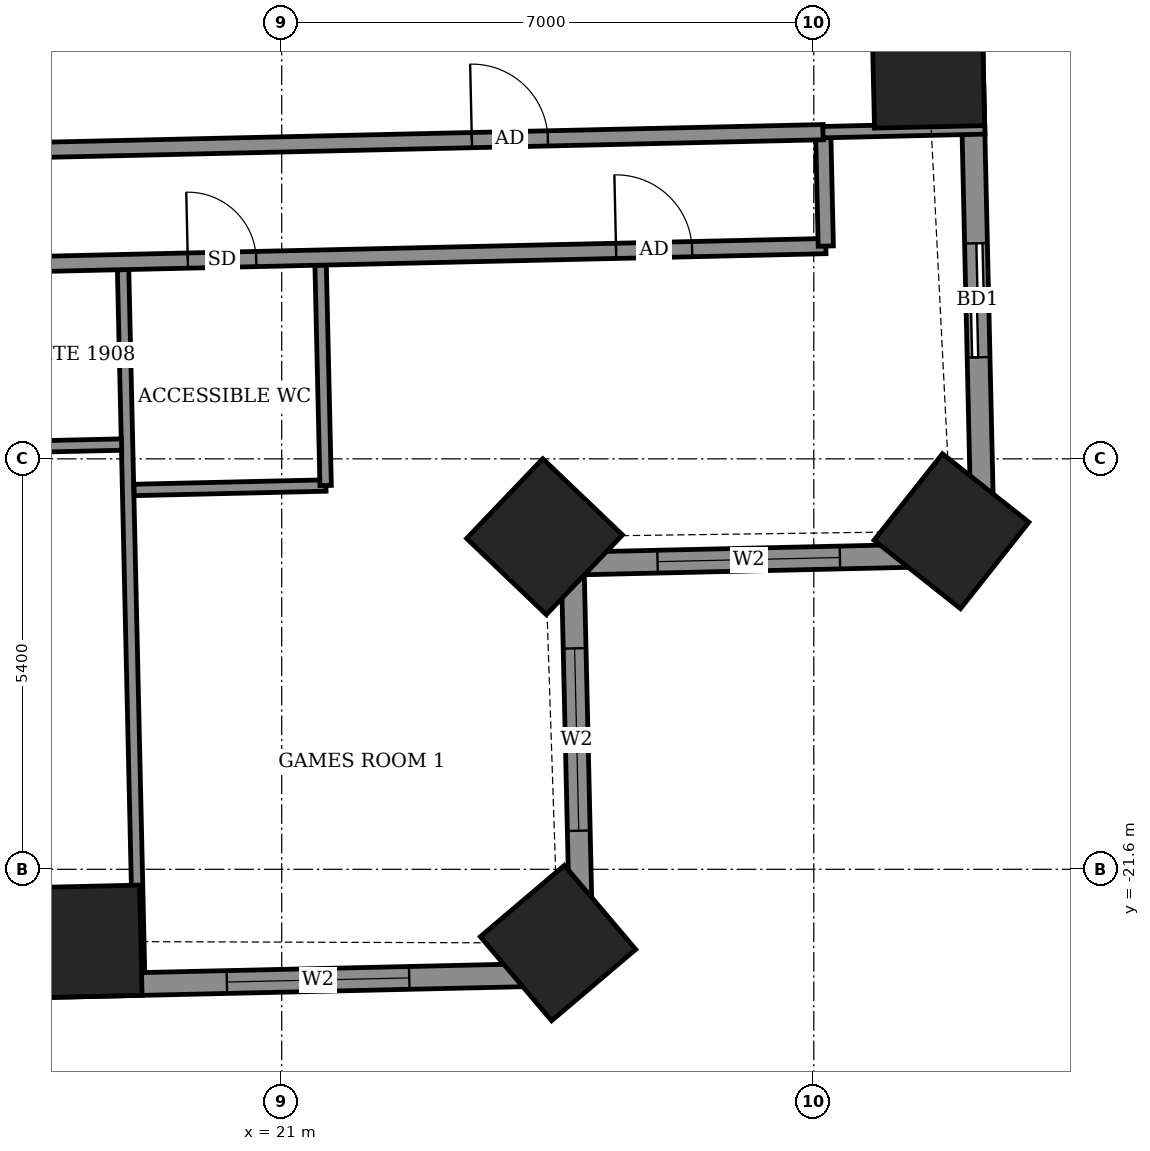
"""IFC4 building model, lengths in metres.
Left out: names, types, materials, properties, quantities, classifications, styles, units other than length and angle.
Written with IfcOpenShell. Run it as: python <this file> out.ifc"""

import sys

from ifc_helpers import new_model, si_unit, direction, frame, frame_2d, origin, origin_2d, place, context, subcontext, project, spatial, rectangle, extrude, element, fill, save


model = new_model("IFC4")
c1 = context("Model", 3, precision=1e-05, world=origin(), true_north=direction((0.0, 1.0)))
c2 = subcontext(c1, "Body", "Model", "MODEL_VIEW")
j1 = project(units=[si_unit("LENGTHUNIT", "METRE"), si_unit("PLANEANGLEUNIT", "RADIAN")], contexts=[c1])
p1 = place(None, origin())
s1 = spatial("IfcSite", under=j1, at=p1, CompositionType="ELEMENT")
p2 = place(p1, origin())
s2 = spatial("IfcBuilding", under=s1, at=p2, CompositionType="ELEMENT")
p3 = place(p2, frame((0.0, 0.0, 79.3)))
s3 = spatial("IfcBuildingStorey", under=s2, at=p3, CompositionType="ELEMENT", Elevation=79.3)
for number, where, z_axis, x_axis in (
    (1, (18.422, -22.549, -0.55), (0.0, 0.0, 1.0), (1.0, 0.023, 0.0)),
    (2, (24.635, -22.57, -0.55), (0.0, 0.0, 1.0), (0.763, 0.647, 0.0)),
    (3, (24.458, -17.224, -0.55), (0.0, 0.0, 1.0), (0.691, 0.723, 0.0)),
    (4, (29.812, -17.152, -0.55), (0.0, 0.0, 1.0), (0.621, 0.784, 0.0)),
    (5, (29.507, -11.107, -0.55), (0.0, 0.0, 1.0), (-0.023, 1.0, 0.0)),
):
    element("IfcColumn", number, at=place(p3, frame(where, z_axis=z_axis, x_axis=x_axis)), inside=s3, PredefinedType="COLUMN", context=c2, shape_type="SweptSolid", body=[
        extrude(rectangle(XDim=1.45, YDim=1.45, at=origin_2d()), origin(), (0.0, 0.0, 1.0), 3.6),
    ])
p4 = place(p3, frame((30.227, -17.455, 0.0), z_axis=(0.0, 0.0, 1.0), x_axis=(-0.022734702163, 0.999741533256, 0.0)))
e6 = element("IfcWall", 6, at=p4, inside=s3, PredefinedType="SOLIDWALL", context=c2, shape_type="SweptSolid", body=[
    extrude(rectangle(XDim=12.929, YDim=0.3, at=frame_2d((6.465, 0.0))), origin(), (0.0, 0.0, 1.0), 3.05),
])
p5 = place(p4, frame((2.592, 0.0, 0.0)))
e7 = element("IfcOpeningElement", 7, at=p5, cuts=e6, PredefinedType="OPENING", context=c2, shape_type="SweptSolid", body=[
    extrude(rectangle(XDim=1.5, YDim=2.4, at=frame_2d((0.75, 1.2))), frame((0.0, 0.16, 0.0), z_axis=(0.0, -1.0, 0.0), x_axis=(1.0, 0.0, 0.0)), (0.0, 0.0, 1.0), 0.32),
])
p6 = place(p4, frame((7.659, 0.0, 0.9)))
e8 = element("IfcOpeningElement", 8, at=p6, cuts=e6, PredefinedType="OPENING", context=c2, shape_type="SweptSolid", body=[
    extrude(rectangle(XDim=1.2, YDim=1.5, at=frame_2d((0.6, 0.75))), frame((0.0, 0.16, 0.0), z_axis=(0.0, -1.0, 0.0), x_axis=(1.0, 0.0, 0.0)), (0.0, 0.0, 1.0), 0.32),
])
p7 = place(p3, frame((-21.409, -24.029, 0.0), z_axis=(0.0, 0.0, 1.0), x_axis=(0.999742634032, 0.022686244721, 0.0)))
e9 = element("IfcWall", 9, at=p7, inside=s3, PredefinedType="SOLIDWALL", context=c2, shape_type="SweptSolid", body=[
    extrude(rectangle(XDim=46.372, YDim=0.3, at=frame_2d((23.186, 0.0))), origin(), (0.0, 0.0, 1.0), 3.05),
])
p8 = place(p7, frame((1.985, 0.0, 0.0)))
e10 = element("IfcOpeningElement", 10, at=p8, cuts=e9, PredefinedType="OPENING", context=c2, shape_type="SweptSolid", body=[
    extrude(rectangle(XDim=1.5, YDim=2.4, at=frame_2d((0.75, 1.2))), frame((0.0, 0.16, 0.0), z_axis=(0.0, -1.0, 0.0), x_axis=(1.0, 0.0, 0.0)), (0.0, 0.0, 1.0), 0.32),
])
p9 = place(p7, frame((7.371, 0.0, 0.0)))
e11 = element("IfcOpeningElement", 11, at=p9, cuts=e9, PredefinedType="OPENING", context=c2, shape_type="SweptSolid", body=[
    extrude(rectangle(XDim=1.2, YDim=2.4, at=frame_2d((0.6, 1.2))), frame((0.0, 0.16, 0.0), z_axis=(0.0, -1.0, 0.0), x_axis=(1.0, 0.0, 0.0)), (0.0, 0.0, 1.0), 0.32),
])
p10 = place(p7, frame((10.08, 0.0, 0.0)))
e12 = element("IfcOpeningElement", 12, at=p10, cuts=e9, PredefinedType="OPENING", context=c2, shape_type="SweptSolid", body=[
    extrude(rectangle(XDim=1.5, YDim=2.4, at=frame_2d((0.75, 1.2))), frame((0.0, 0.16, 0.0), z_axis=(0.0, -1.0, 0.0), x_axis=(1.0, 0.0, 0.0)), (0.0, 0.0, 1.0), 0.32),
])
p11 = place(p7, frame((15.08, 0.0, 0.0)))
e13 = element("IfcOpeningElement", 13, at=p11, cuts=e9, PredefinedType="OPENING", context=c2, shape_type="SweptSolid", body=[
    extrude(rectangle(XDim=1.5, YDim=2.4, at=frame_2d((0.75, 1.2))), frame((0.0, 0.16, 0.0), z_axis=(0.0, -1.0, 0.0), x_axis=(1.0, 0.0, 0.0)), (0.0, 0.0, 1.0), 0.32),
])
p12 = place(p7, frame((20.813, 0.0, 0.0)))
e14 = element("IfcOpeningElement", 14, at=p12, cuts=e9, PredefinedType="OPENING", context=c2, shape_type="SweptSolid", body=[
    extrude(rectangle(XDim=1.2, YDim=2.4, at=frame_2d((0.6, 1.2))), frame((0.0, 0.16, 0.0), z_axis=(0.0, -1.0, 0.0), x_axis=(1.0, 0.0, 0.0)), (0.0, 0.0, 1.0), 0.32),
])
p13 = place(p7, frame((23.522, 0.0, 0.0)))
e15 = element("IfcOpeningElement", 15, at=p13, cuts=e9, PredefinedType="OPENING", context=c2, shape_type="SweptSolid", body=[
    extrude(rectangle(XDim=1.5, YDim=2.4, at=frame_2d((0.75, 1.2))), frame((0.0, 0.16, 0.0), z_axis=(0.0, -1.0, 0.0), x_axis=(1.0, 0.0, 0.0)), (0.0, 0.0, 1.0), 0.32),
])
p14 = place(p7, frame((28.7, 0.0, 0.0)))
e16 = element("IfcOpeningElement", 16, at=p14, cuts=e9, PredefinedType="OPENING", context=c2, shape_type="SweptSolid", body=[
    extrude(rectangle(XDim=1.5, YDim=2.4, at=frame_2d((0.75, 1.2))), frame((0.0, 0.16, 0.0), z_axis=(0.0, -1.0, 0.0), x_axis=(1.0, 0.0, 0.0)), (0.0, 0.0, 1.0), 0.32),
])
p15 = place(p7, frame((34.206, 0.0, 0.0)))
e17 = element("IfcOpeningElement", 17, at=p15, cuts=e9, PredefinedType="OPENING", context=c2, shape_type="SweptSolid", body=[
    extrude(rectangle(XDim=1.5, YDim=2.4, at=frame_2d((0.75, 1.2))), frame((0.0, 0.16, 0.0), z_axis=(0.0, -1.0, 0.0), x_axis=(1.0, 0.0, 0.0)), (0.0, 0.0, 1.0), 0.32),
])
p16 = place(p7, frame((37.065, 0.0, 0.0)))
e18 = element("IfcOpeningElement", 18, at=p16, cuts=e9, PredefinedType="OPENING", context=c2, shape_type="SweptSolid", body=[
    extrude(rectangle(XDim=1.5, YDim=2.4, at=frame_2d((0.75, 1.2))), frame((0.0, 0.16, 0.0), z_axis=(0.0, -1.0, 0.0), x_axis=(1.0, 0.0, 0.0)), (0.0, 0.0, 1.0), 0.32),
])
p17 = place(p7, frame((41.698, 0.0, 0.9)))
e19 = element("IfcOpeningElement", 19, at=p17, cuts=e9, PredefinedType="OPENING", context=c2, shape_type="SweptSolid", body=[
    extrude(rectangle(XDim=2.4, YDim=1.5, at=frame_2d((1.2, 0.75))), frame((0.0, 0.16, 0.0), z_axis=(0.0, -1.0, 0.0), x_axis=(1.0, 0.0, 0.0)), (0.0, 0.0, 1.0), 0.32),
])
p18 = place(p3, frame((24.951, -22.977, 0.0), z_axis=(0.0, 0.0, 1.0), x_axis=(-0.022784045517, 0.999740409941, 0.0)))
e20 = element("IfcWall", 20, at=p18, inside=s3, PredefinedType="SOLIDWALL", context=c2, shape_type="SweptSolid", body=[
    extrude(rectangle(XDim=5.401, YDim=0.3, at=frame_2d((2.7, 0.0))), origin(), (0.0, 0.0, 1.0), 2.55),
])
p19 = place(p18, frame((1.885, 0.0, 0.9)))
e21 = element("IfcOpeningElement", 21, at=p19, cuts=e20, PredefinedType="OPENING", context=c2, shape_type="SweptSolid", body=[
    extrude(rectangle(XDim=2.4, YDim=1.5, at=frame_2d((1.2, 0.75))), frame((0.0, 0.16, 0.0), z_axis=(0.0, -1.0, 0.0), x_axis=(1.0, 0.0, 0.0)), (0.0, 0.0, 1.0), 0.32),
])
p20 = place(p3, frame((24.828, -17.578, 0.0), z_axis=(0.0, 0.0, 1.0), x_axis=(0.99974143864, 0.022738862475, 0.0)))
e22 = element("IfcWall", 22, at=p20, inside=s3, PredefinedType="SOLIDWALL", context=c2, shape_type="SweptSolid", body=[
    extrude(rectangle(XDim=5.401, YDim=0.3, at=frame_2d((2.7, 0.0))), origin(), (0.0, 0.0, 1.0), 2.55),
])
p21 = place(p20, frame((1.117, 0.0, 0.9)))
e23 = element("IfcOpeningElement", 23, at=p21, cuts=e22, PredefinedType="OPENING", context=c2, shape_type="SweptSolid", body=[
    extrude(rectangle(XDim=2.4, YDim=1.5, at=frame_2d((1.2, 0.75))), frame((0.0, 0.16, 0.0), z_axis=(0.0, -1.0, 0.0), x_axis=(1.0, 0.0, 0.0)), (0.0, 0.0, 1.0), 0.32),
])
p22 = place(p3, frame((19.123, -22.959, 0.0), z_axis=(0.0, 0.0, 1.0), x_axis=(-0.022697424684, 0.999742380272, 0.0)))
e24 = element("IfcWall", 24, at=p22, inside=s3, PredefinedType="PARTITIONING", context=c2, shape_type="SweptSolid", body=[
    extrude(rectangle(XDim=9.25, YDim=0.15, at=frame_2d((4.625, 0.0))), origin(), (0.0, 0.0, 1.0), 2.55),
])
p23 = place(p3, frame((19.058, -16.609, 0.0), z_axis=(0.0, 0.0, 1.0), x_axis=(0.999737322729, 0.022919108675, 0.0)))
e25 = element("IfcWall", 25, at=p23, inside=s3, PredefinedType="PARTITIONING", context=c2, shape_type="SweptSolid", body=[
    extrude(rectangle(XDim=2.525, YDim=0.15, at=frame_2d((1.262, 0.0))), origin(), (0.0, 0.0, 1.0), 3.05),
])
p24 = place(p3, frame((21.578, -16.551, 0.0), z_axis=(0.0, 0.0, 1.0), x_axis=(-0.022732880677, 0.999741574676, 0.0)))
e26 = element("IfcWall", 26, at=p24, inside=s3, PredefinedType="PARTITIONING", context=c2, shape_type="SweptSolid", body=[
    extrude(rectangle(XDim=2.9, YDim=0.15, at=frame_2d((1.45, 0.0))), origin(), (0.0, 0.0, 1.0), 3.05),
])
p25 = place(p3, frame((16.57, -16.065, 0.0), z_axis=(0.0, 0.0, 1.0), x_axis=(0.999740260747, 0.02279059109, 0.0)))
e27 = element("IfcWall", 27, at=p25, inside=s3, PredefinedType="PARTITIONING", context=c2, shape_type="SweptSolid", body=[
    extrude(rectangle(XDim=2.324, YDim=0.15, at=frame_2d((1.162, 0.0))), origin(), (0.0, 0.0, 1.0), 3.05),
])
p26 = place(p3, frame((-24.249, -14.591, 0.0), z_axis=(0.0, 0.0, 1.0), x_axis=(0.999742227308, 0.022704161211, 0.0)))
e28 = element("IfcWall", 28, at=p26, inside=s3, PredefinedType="PARTITIONING", context=c2, shape_type="SweptSolid", body=[
    extrude(rectangle(XDim=52.421, YDim=0.2, at=frame_2d((26.211, 0.0))), origin(), (0.0, 0.0, 1.0), 3.05),
])
p27 = place(p26, frame((0.575, 0.0, 0.0)))
e29 = element("IfcOpeningElement", 29, at=p27, cuts=e28, PredefinedType="OPENING", context=c2, shape_type="SweptSolid", body=[
    extrude(rectangle(XDim=1.0, YDim=2.1, at=frame_2d((0.5, 1.05))), frame((0.0, 0.11, 0.0), z_axis=(0.0, -1.0, 0.0), x_axis=(1.0, 0.0, 0.0)), (0.0, 0.0, 1.0), 0.22),
])
p28 = place(p26, frame((5.225, 0.0, 0.0)))
e30 = element("IfcOpeningElement", 30, at=p28, cuts=e28, PredefinedType="OPENING", context=c2, shape_type="SweptSolid", body=[
    extrude(rectangle(XDim=0.9, YDim=2.1, at=frame_2d((0.45, 1.05))), frame((0.0, 0.11, 0.0), z_axis=(0.0, -1.0, 0.0), x_axis=(1.0, 0.0, 0.0)), (0.0, 0.0, 1.0), 0.22),
])
p29 = place(p26, frame((10.075, 0.0, 0.0)))
e31 = element("IfcOpeningElement", 31, at=p29, cuts=e28, PredefinedType="OPENING", context=c2, shape_type="SweptSolid", body=[
    extrude(rectangle(XDim=0.9, YDim=2.1, at=frame_2d((0.45, 1.05))), frame((0.0, 0.11, 0.0), z_axis=(0.0, -1.0, 0.0), x_axis=(1.0, 0.0, 0.0)), (0.0, 0.0, 1.0), 0.22),
])
p30 = place(p26, frame((12.1, 0.0, 0.0)))
e32 = element("IfcOpeningElement", 32, at=p30, cuts=e28, PredefinedType="OPENING", context=c2, shape_type="SweptSolid", body=[
    extrude(rectangle(XDim=0.9, YDim=2.1, at=frame_2d((0.45, 1.05))), frame((0.0, 0.11, 0.0), z_axis=(0.0, -1.0, 0.0), x_axis=(1.0, 0.0, 0.0)), (0.0, 0.0, 1.0), 0.22),
])
p31 = place(p26, frame((19.025, 0.0, 0.0)))
e33 = element("IfcOpeningElement", 33, at=p31, cuts=e28, PredefinedType="OPENING", context=c2, shape_type="SweptSolid", body=[
    extrude(rectangle(XDim=0.9, YDim=2.1, at=frame_2d((0.45, 1.05))), frame((0.0, 0.11, 0.0), z_axis=(0.0, -1.0, 0.0), x_axis=(1.0, 0.0, 0.0)), (0.0, 0.0, 1.0), 0.22),
])
p32 = place(p26, frame((21.225, 0.0, 0.0)))
e34 = element("IfcOpeningElement", 34, at=p32, cuts=e28, PredefinedType="OPENING", context=c2, shape_type="SweptSolid", body=[
    extrude(rectangle(XDim=0.9, YDim=2.1, at=frame_2d((0.45, 1.05))), frame((0.0, 0.11, 0.0), z_axis=(0.0, -1.0, 0.0), x_axis=(1.0, 0.0, 0.0)), (0.0, 0.0, 1.0), 0.22),
])
p33 = place(p26, frame((28.175, 0.0, 0.0)))
e35 = element("IfcOpeningElement", 35, at=p33, cuts=e28, PredefinedType="OPENING", context=c2, shape_type="SweptSolid", body=[
    extrude(rectangle(XDim=0.9, YDim=2.1, at=frame_2d((0.45, 1.05))), frame((0.0, 0.11, 0.0), z_axis=(0.0, -1.0, 0.0), x_axis=(1.0, 0.0, 0.0)), (0.0, 0.0, 1.0), 0.22),
])
p34 = place(p26, frame((30.425, 0.0, 0.0)))
e36 = element("IfcOpeningElement", 36, at=p34, cuts=e28, PredefinedType="OPENING", context=c2, shape_type="SweptSolid", body=[
    extrude(rectangle(XDim=0.9, YDim=2.1, at=frame_2d((0.45, 1.05))), frame((0.0, 0.11, 0.0), z_axis=(0.0, -1.0, 0.0), x_axis=(1.0, 0.0, 0.0)), (0.0, 0.0, 1.0), 0.22),
])
p35 = place(p26, frame((37.4, 0.0, 0.0)))
e37 = element("IfcOpeningElement", 37, at=p35, cuts=e28, PredefinedType="OPENING", context=c2, shape_type="SweptSolid", body=[
    extrude(rectangle(XDim=0.9, YDim=2.1, at=frame_2d((0.45, 1.05))), frame((0.0, 0.11, 0.0), z_axis=(0.0, -1.0, 0.0), x_axis=(1.0, 0.0, 0.0)), (0.0, 0.0, 1.0), 0.22),
])
p36 = place(p26, frame((39.375, 0.0, 0.0)))
e38 = element("IfcOpeningElement", 38, at=p36, cuts=e28, PredefinedType="OPENING", context=c2, shape_type="SweptSolid", body=[
    extrude(rectangle(XDim=0.9, YDim=2.1, at=frame_2d((0.45, 1.05))), frame((0.0, 0.11, 0.0), z_axis=(0.0, -1.0, 0.0), x_axis=(1.0, 0.0, 0.0)), (0.0, 0.0, 1.0), 0.22),
])
p37 = place(p26, frame((49.661, 0.0, 0.0)))
e39 = element("IfcOpeningElement", 39, at=p37, cuts=e28, PredefinedType="OPENING", context=c2, shape_type="SweptSolid", body=[
    extrude(rectangle(XDim=1.0, YDim=2.1, at=frame_2d((0.5, 1.05))), frame((0.0, 0.11, 0.0), z_axis=(0.0, -1.0, 0.0), x_axis=(1.0, 0.0, 0.0)), (0.0, 0.0, 1.0), 0.22),
])
p38 = place(p26, frame((44.025, 0.0, 0.0)))
e40 = element("IfcOpeningElement", 40, at=p38, cuts=e28, PredefinedType="OPENING", context=c2, shape_type="SweptSolid", body=[
    extrude(rectangle(XDim=0.9, YDim=2.1, at=frame_2d((0.45, 1.05))), frame((0.0, 0.11, 0.0), z_axis=(0.0, -1.0, 0.0), x_axis=(1.0, 0.0, 0.0)), (0.0, 0.0, 1.0), 0.22),
])
p39 = place(p3, frame((28.158, -13.401, 0.0), z_axis=(0.0, 0.0, 1.0), x_axis=(-0.022636322434, 0.999743765625, 0.0)))
e41 = element("IfcWall", 41, at=p39, inside=s3, PredefinedType="PARTITIONING", context=c2, shape_type="SweptSolid", body=[
    extrude(rectangle(XDim=1.499, YDim=0.2, at=frame_2d((0.75, 0.0))), origin(), (0.0, 0.0, 1.0), 3.05),
])
p40 = place(p3, frame((17.753, -12.137, 0.0), z_axis=(0.0, 0.0, 1.0), x_axis=(0.999743727281, 0.022638015856, 0.0)))
e42 = element("IfcWall", 42, at=p40, inside=s3, PredefinedType="PARTITIONING", context=c2, shape_type="SweptSolid", body=[
    extrude(rectangle(XDim=10.375, YDim=0.2, at=frame_2d((5.188, 0.0))), origin(), (0.0, 0.0, 1.0), 3.05),
])
p41 = place(p40, frame((5.75, 0.0, 0.0)))
e43 = element("IfcOpeningElement", 43, at=p41, cuts=e42, PredefinedType="OPENING", context=c2, shape_type="SweptSolid", body=[
    extrude(rectangle(XDim=1.0, YDim=2.1, at=frame_2d((0.5, 1.05))), frame((0.0, 0.11, 0.0), z_axis=(0.0, -1.0, 0.0), x_axis=(1.0, 0.0, 0.0)), (0.0, 0.0, 1.0), 0.22),
])
p42 = place(p3, frame((28.121, -11.902, 0.0), z_axis=(0.0, 0.0, 1.0), x_axis=(0.999734443994, 0.023044337528, 0.0)))
e44 = element("IfcWall", 44, at=p42, inside=s3, PredefinedType="PARTITIONING", context=c2, shape_type="SweptSolid", body=[
    extrude(rectangle(XDim=2.129, YDim=0.15, at=frame_2d((1.065, 0.0))), origin(), (0.0, 0.0, 1.0), 2.55),
])
p43 = place(p5, origin())
e45 = element("IfcDoor", 45, at=p43, inside=s3, OperationType="SLIDING_TO_LEFT", PredefinedType="DOOR", context=c2, shape_type="SweptSolid", body=[
    extrude(rectangle(XDim=1.5, YDim=2.4, at=frame_2d((0.75, 1.2))), frame((0.0, 0.025, 0.0), z_axis=(0.0, -1.0, 0.0), x_axis=(1.0, 0.0, 0.0)), (0.0, 0.0, 1.0), 0.05),
])
fill(e7, e45)
p44 = place(p17, origin())
e46 = element("IfcWindow", 46, at=p44, inside=s3, PartitioningType="DOUBLE_PANEL_VERTICAL", PredefinedType="WINDOW", context=c2, shape_type="SweptSolid", body=[
    extrude(rectangle(XDim=2.4, YDim=1.5, at=frame_2d((1.2, 0.75))), frame((0.0, 0.03, 0.0), z_axis=(0.0, -1.0, 0.0), x_axis=(1.0, 0.0, 0.0)), (0.0, 0.0, 1.0), 0.06),
])
fill(e19, e46)
p45 = place(p19, origin())
e47 = element("IfcWindow", 47, at=p45, inside=s3, PartitioningType="DOUBLE_PANEL_VERTICAL", PredefinedType="WINDOW", context=c2, shape_type="SweptSolid", body=[
    extrude(rectangle(XDim=2.4, YDim=1.5, at=frame_2d((1.2, 0.75))), frame((0.0, 0.03, 0.0), z_axis=(0.0, -1.0, 0.0), x_axis=(1.0, 0.0, 0.0)), (0.0, 0.0, 1.0), 0.06),
])
fill(e21, e47)
p46 = place(p21, origin())
e48 = element("IfcWindow", 48, at=p46, inside=s3, PartitioningType="DOUBLE_PANEL_VERTICAL", PredefinedType="WINDOW", context=c2, shape_type="SweptSolid", body=[
    extrude(rectangle(XDim=2.4, YDim=1.5, at=frame_2d((1.2, 0.75))), frame((0.0, 0.03, 0.0), z_axis=(0.0, -1.0, 0.0), x_axis=(1.0, 0.0, 0.0)), (0.0, 0.0, 1.0), 0.06),
])
fill(e23, e48)
p47 = place(p37, origin())
e49 = element("IfcDoor", 49, at=p47, inside=s3, OperationType="SINGLE_SWING_RIGHT", PredefinedType="DOOR", context=c2, shape_type="SweptSolid", body=[
    extrude(rectangle(XDim=1.0, YDim=2.1, at=frame_2d((0.5, 1.05))), frame((0.0, 0.025, 0.0), z_axis=(0.0, -1.0, 0.0), x_axis=(1.0, 0.0, 0.0)), (0.0, 0.0, 1.0), 0.05),
])
fill(e39, e49)
p48 = place(p38, origin())
e50 = element("IfcDoor", 50, at=p48, inside=s3, OperationType="SINGLE_SWING_RIGHT", PredefinedType="DOOR", context=c2, shape_type="SweptSolid", body=[
    extrude(rectangle(XDim=0.9, YDim=2.1, at=frame_2d((0.45, 1.05))), frame((0.0, 0.025, 0.0), z_axis=(0.0, -1.0, 0.0), x_axis=(1.0, 0.0, 0.0)), (0.0, 0.0, 1.0), 0.05),
])
fill(e40, e50)
p49 = place(p41, origin())
e51 = element("IfcDoor", 51, at=p49, inside=s3, OperationType="SINGLE_SWING_LEFT", PredefinedType="DOOR", context=c2, shape_type="SweptSolid", body=[
    extrude(rectangle(XDim=1.0, YDim=2.1, at=frame_2d((0.5, 1.05))), frame((0.0, 0.025, 0.0), z_axis=(0.0, -1.0, 0.0), x_axis=(1.0, 0.0, 0.0)), (0.0, 0.0, 1.0), 0.05),
])
fill(e43, e51)
save(model, sys.argv[1])
